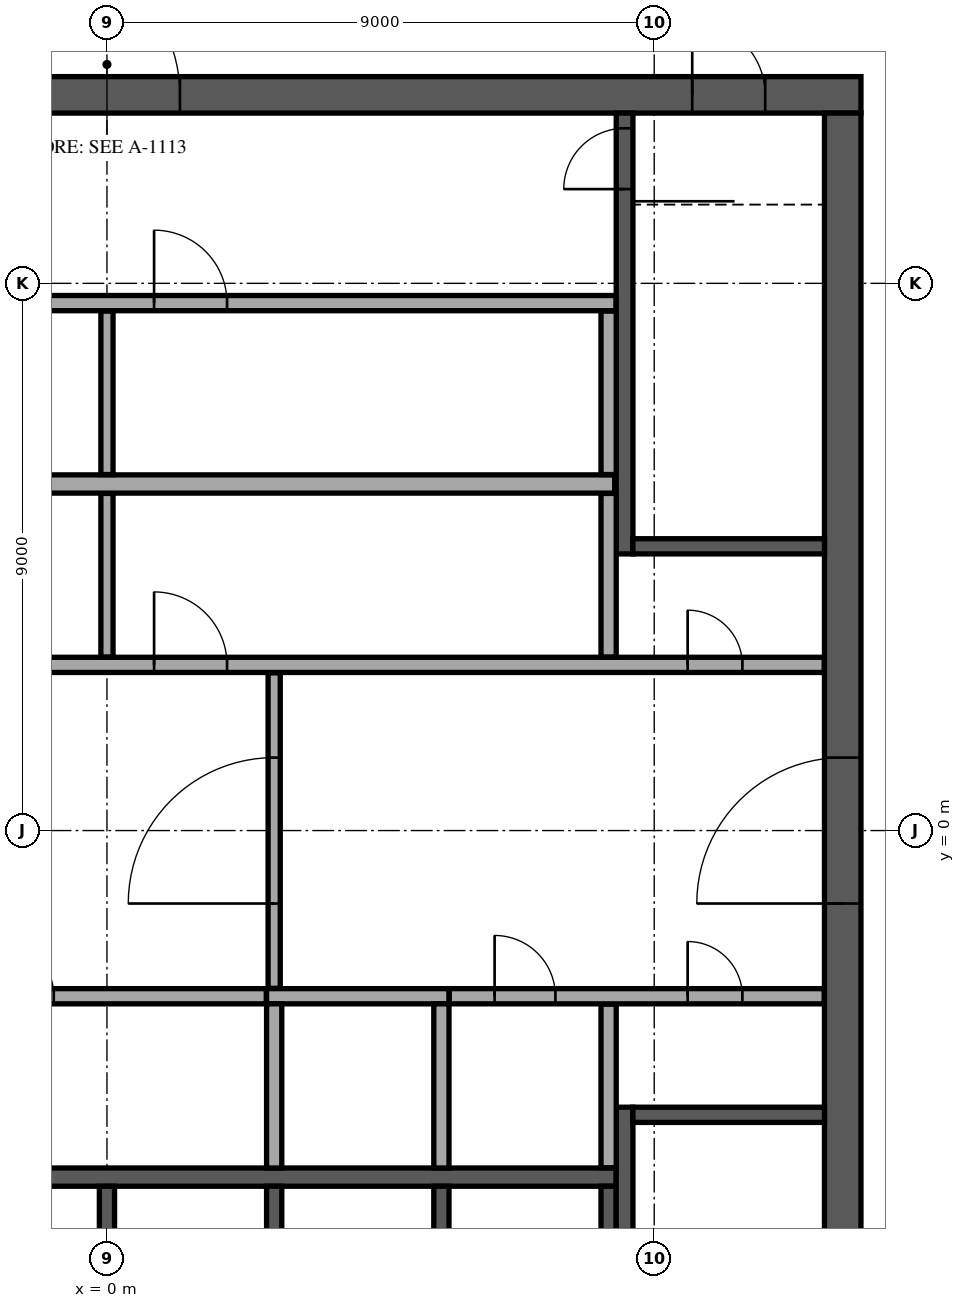
"""IFC4 building model, lengths in metres.
Left out: names, types, materials, properties, quantities, classifications, styles, units other than length and angle.
Written with IfcOpenShell. Run it as: python <this file> out.ifc"""

import sys

from ifc_helpers import new_model, si_unit, direction, frame, frame_2d, origin, place, context, subcontext, project, spatial, rectangle, extrude, element, fill, save


model = new_model("IFC4")
c1 = context("Model", 3, precision=1e-05, world=origin(), true_north=direction((0.0, 1.0)))
c2 = subcontext(c1, "Body", "Model", "MODEL_VIEW")
j1 = project(units=[si_unit("LENGTHUNIT", "METRE"), si_unit("PLANEANGLEUNIT", "RADIAN")], contexts=[c1])
p1 = place(None, origin())
s1 = spatial("IfcSite", under=j1, at=p1, CompositionType="ELEMENT")
p2 = place(p1, origin())
s2 = spatial("IfcBuilding", under=s1, at=p2, CompositionType="ELEMENT")
p3 = place(p2, frame((0.0, 0.0, 373.1)))
s3 = spatial("IfcBuildingStorey", under=s2, at=p3, CompositionType="ELEMENT", Elevation=373.1)
p4 = place(p3, frame((-12.4, 12.1, 0.0), z_axis=(0.0, 0.0, 1.0), x_axis=(1.0, 0.0, 0.0)))
e1 = element("IfcWall", 1, at=p4, inside=s3, PredefinedType="SHEAR", context=c2, shape_type="SweptSolid", body=[
    extrude(rectangle(XDim=24.8, YDim=0.6, at=frame_2d((12.4, 0.0))), origin(), (0.0, 0.0, 1.0), 3.2),
])
p5 = place(p4, frame((11.2, 0.0, 0.0)))
e2 = element("IfcOpeningElement", 2, at=p5, cuts=e1, PredefinedType="OPENING", context=c2, shape_type="SweptSolid", body=[
    extrude(rectangle(XDim=2.4, YDim=2.4, at=frame_2d((1.2, 1.2))), frame((0.0, 0.31, 0.0), z_axis=(0.0, -1.0, 0.0), x_axis=(1.0, 0.0, 0.0)), (0.0, 0.0, 1.0), 0.62),
])
p6 = place(p4, frame((22.025, 0.0, 0.0)))
e3 = element("IfcOpeningElement", 3, at=p6, cuts=e1, PredefinedType="OPENING", context=c2, shape_type="SweptSolid", body=[
    extrude(rectangle(XDim=1.2, YDim=2.1, at=frame_2d((0.6, 1.05))), frame((0.0, 0.31, 0.0), z_axis=(0.0, -1.0, 0.0), x_axis=(1.0, 0.0, 0.0)), (0.0, 0.0, 1.0), 0.62),
])
p7 = place(p4, frame((1.0, 0.0, 0.0)))
e4 = element("IfcOpeningElement", 4, at=p7, cuts=e1, PredefinedType="OPENING", context=c2, shape_type="SweptSolid", body=[
    extrude(rectangle(XDim=1.0, YDim=2.1, at=frame_2d((0.5, 1.05))), frame((0.0, 0.31, 0.0), z_axis=(0.0, -1.0, 0.0), x_axis=(1.0, 0.0, 0.0)), (0.0, 0.0, 1.0), 0.62),
])
p8 = place(p3, frame((12.1, -11.8, 0.0), z_axis=(0.0, 0.0, 1.0), x_axis=(0.0, 1.0, 0.0)))
e5 = element("IfcWall", 5, at=p8, inside=s3, PredefinedType="SHEAR", context=c2, shape_type="SweptSolid", body=[
    extrude(rectangle(XDim=23.6, YDim=0.6, at=frame_2d((11.8, 0.0))), origin(), (0.0, 0.0, 1.0), 3.2),
])
p9 = place(p8, frame((10.6, 0.0, 0.0)))
e6 = element("IfcOpeningElement", 6, at=p9, cuts=e5, PredefinedType="OPENING", context=c2, shape_type="SweptSolid", body=[
    extrude(rectangle(XDim=2.4, YDim=2.4, at=frame_2d((1.2, 1.2))), frame((0.0, 0.31, 0.0), z_axis=(0.0, -1.0, 0.0), x_axis=(1.0, 0.0, 0.0)), (0.0, 0.0, 1.0), 0.62),
])
p10 = place(p3, frame((-2.875, -5.7, 0.0), z_axis=(0.0, 0.0, 1.0), x_axis=(1.0, 0.0, 0.0)))
e7 = element("IfcWall", 7, at=p10, inside=s3, PredefinedType="SOLIDWALL", context=c2, shape_type="SweptSolid", body=[
    extrude(rectangle(XDim=11.25, YDim=0.3, at=frame_2d((5.625, 0.0))), origin(), (0.0, 0.0, 1.0), 3.2),
])
p11 = place(p3, frame((2.625, -2.725, 0.0), z_axis=(0.0, 0.0, 1.0), x_axis=(1.0, 0.0, 0.0)))
e8 = element("IfcWall", 8, at=p11, inside=s3, PredefinedType="SOLIDWALL", context=c2, shape_type="SweptSolid", body=[
    extrude(rectangle(XDim=3.0, YDim=0.25, at=frame_2d((1.5, 0.0))), origin(), (0.0, 0.0, 1.0), 3.2),
])
for number, where, z_axis, x_axis in (
    (9, (2.75, -5.55, 0.0), (0.0, 0.0, 1.0), (0.0, 1.0, 0.0)),
    (10, (5.5, -5.55, 0.0), (0.0, 0.0, 1.0), (0.0, 1.0, 0.0)),
    (11, (0.0, -8.55, 0.0), (0.0, 0.0, 1.0), (0.0, 1.0, 0.0)),
    (12, (2.75, -8.55, 0.0), (0.0, 0.0, 1.0), (0.0, 1.0, 0.0)),
    (13, (5.5, -8.55, 0.0), (0.0, 0.0, 1.0), (0.0, 1.0, 0.0)),
    (14, (8.25, -8.55, 0.0), (0.0, 0.0, 1.0), (0.0, 1.0, 0.0)),
):
    element("IfcWall", number, at=place(p3, frame(where, z_axis=z_axis, x_axis=x_axis)), inside=s3, PredefinedType="SOLIDWALL", context=c2, shape_type="SweptSolid", body=[
        extrude(rectangle(XDim=2.7, YDim=0.25, at=frame_2d((1.35, 0.0))), origin(), (0.0, 0.0, 1.0), 3.2),
    ])
p12 = place(p3, frame((8.512, 4.55, 0.0), z_axis=(0.0, 0.0, 1.0), x_axis=(0.0, 1.0, 0.0)))
e15 = element("IfcWall", 15, at=p12, inside=s3, PredefinedType="SOLIDWALL", context=c2, shape_type="SweptSolid", body=[
    extrude(rectangle(XDim=7.25, YDim=0.275, at=frame_2d((3.625, 0.0))), origin(), (0.0, 0.0, 1.0), 3.2),
])
p13 = place(p12, frame((6.0, 0.0, 0.0)))
e16 = element("IfcOpeningElement", 16, at=p13, cuts=e15, PredefinedType="OPENING", context=c2, shape_type="SweptSolid", body=[
    extrude(rectangle(XDim=1.0, YDim=2.1, at=frame_2d((0.5, 1.05))), frame((0.0, 0.147, 0.0), z_axis=(0.0, -1.0, 0.0), x_axis=(1.0, 0.0, 0.0)), (0.0, 0.0, 1.0), 0.295),
])
p14 = place(p3, frame((8.65, 4.675, 0.0), z_axis=(0.0, 0.0, 1.0), x_axis=(1.0, 0.0, 0.0)))
e17 = element("IfcWall", 17, at=p14, inside=s3, PredefinedType="SOLIDWALL", context=c2, shape_type="SweptSolid", body=[
    extrude(rectangle(XDim=3.15, YDim=0.25, at=frame_2d((1.575, 0.0))), origin(), (0.0, 0.0, 1.0), 3.2),
])
p15 = place(p3, frame((8.512, -4.55, 0.0), z_axis=(0.0, 0.0, 1.0), x_axis=(0.0, -1.0, 0.0)))
e18 = element("IfcWall", 18, at=p15, inside=s3, PredefinedType="SOLIDWALL", context=c2, shape_type="SweptSolid", body=[
    extrude(rectangle(XDim=7.25, YDim=0.275, at=frame_2d((3.625, 0.0))), origin(), (0.0, 0.0, 1.0), 3.2),
])
p16 = place(p15, frame((6.0, 0.0, 0.0)))
e19 = element("IfcOpeningElement", 19, at=p16, cuts=e18, PredefinedType="OPENING", context=c2, shape_type="SweptSolid", body=[
    extrude(rectangle(XDim=1.0, YDim=2.1, at=frame_2d((0.5, 1.05))), frame((0.0, 0.147, 0.0), z_axis=(0.0, -1.0, 0.0), x_axis=(1.0, 0.0, 0.0)), (0.0, 0.0, 1.0), 0.295),
])
p17 = place(p3, frame((8.65, -4.675, 0.0), z_axis=(0.0, 0.0, 1.0), x_axis=(1.0, 0.0, 0.0)))
e20 = element("IfcWall", 20, at=p17, inside=s3, PredefinedType="SOLIDWALL", context=c2, shape_type="SweptSolid", body=[
    extrude(rectangle(XDim=3.15, YDim=0.25, at=frame_2d((1.575, 0.0))), origin(), (0.0, 0.0, 1.0), 3.2),
])
p18 = place(p3, frame((8.25, -5.545, 0.0), z_axis=(0.0, 0.0, 1.0), x_axis=(0.0, 1.0, 0.0)))
e21 = element("IfcWall", 21, at=p18, inside=s3, PredefinedType="PARTITIONING", context=c2, shape_type="SweptSolid", body=[
    extrude(rectangle(XDim=2.69, YDim=0.25, at=frame_2d((1.345, 0.0))), origin(), (0.0, 0.0, 1.0), 3.2),
])
p19 = place(p3, frame((-11.795, -2.725, 0.0), z_axis=(0.0, 0.0, 1.0), x_axis=(1.0, 0.0, 0.0)))
e22 = element("IfcWall", 22, at=p19, inside=s3, PredefinedType="PARTITIONING", context=c2, shape_type="SweptSolid", body=[
    extrude(rectangle(XDim=14.415, YDim=0.25, at=frame_2d((7.208, 0.0))), origin(), (0.0, 0.0, 1.0), 3.2),
])
p20 = place(p19, frame((1.295, 0.0, 0.0)))
e23 = element("IfcOpeningElement", 23, at=p20, cuts=e22, PredefinedType="OPENING", context=c2, shape_type="SweptSolid", body=[
    extrude(rectangle(XDim=1.0, YDim=2.1, at=frame_2d((0.5, 1.05))), frame((0.0, 0.135, 0.0), z_axis=(0.0, -1.0, 0.0), x_axis=(1.0, 0.0, 0.0)), (0.0, 0.0, 1.0), 0.27),
])
p21 = place(p19, frame((4.42, 0.0, 0.0)))
e24 = element("IfcOpeningElement", 24, at=p21, cuts=e22, PredefinedType="OPENING", context=c2, shape_type="SweptSolid", body=[
    extrude(rectangle(XDim=1.0, YDim=2.1, at=frame_2d((0.5, 1.05))), frame((0.0, 0.135, 0.0), z_axis=(0.0, -1.0, 0.0), x_axis=(1.0, 0.0, 0.0)), (0.0, 0.0, 1.0), 0.27),
])
p22 = place(p19, frame((9.92, 0.0, 0.0)))
e25 = element("IfcOpeningElement", 25, at=p22, cuts=e22, PredefinedType="OPENING", context=c2, shape_type="SweptSolid", body=[
    extrude(rectangle(XDim=1.0, YDim=2.1, at=frame_2d((0.5, 1.05))), frame((0.0, 0.135, 0.0), z_axis=(0.0, -1.0, 0.0), x_axis=(1.0, 0.0, 0.0)), (0.0, 0.0, 1.0), 0.27),
])
p23 = place(p3, frame((5.63, -2.725, 0.0), z_axis=(0.0, 0.0, 1.0), x_axis=(1.0, 0.0, 0.0)))
e26 = element("IfcWall", 26, at=p23, inside=s3, PredefinedType="PARTITIONING", context=c2, shape_type="SweptSolid", body=[
    extrude(rectangle(XDim=6.165, YDim=0.25, at=frame_2d((3.083, 0.0))), origin(), (0.0, 0.0, 1.0), 3.2),
])
p24 = place(p23, frame((0.745, 0.0, 0.0)))
e27 = element("IfcOpeningElement", 27, at=p24, cuts=e26, PredefinedType="OPENING", context=c2, shape_type="SweptSolid", body=[
    extrude(rectangle(XDim=1.0, YDim=2.1, at=frame_2d((0.5, 1.05))), frame((0.0, 0.135, 0.0), z_axis=(0.0, -1.0, 0.0), x_axis=(1.0, 0.0, 0.0)), (0.0, 0.0, 1.0), 0.27),
])
p25 = place(p23, frame((3.92, 0.0, 0.0)))
e28 = element("IfcOpeningElement", 28, at=p25, cuts=e26, PredefinedType="OPENING", context=c2, shape_type="SweptSolid", body=[
    extrude(rectangle(XDim=0.9, YDim=2.1, at=frame_2d((0.45, 1.05))), frame((0.0, 0.135, 0.0), z_axis=(0.0, -1.0, 0.0), x_axis=(1.0, 0.0, 0.0)), (0.0, 0.0, 1.0), 0.27),
])
p26 = place(p3, frame((2.75, -2.595, 0.0), z_axis=(0.0, 0.0, 1.0), x_axis=(0.0, 1.0, 0.0)))
e29 = element("IfcWall", 29, at=p26, inside=s3, PredefinedType="PARTITIONING", context=c2, shape_type="SweptSolid", body=[
    extrude(rectangle(XDim=5.19, YDim=0.2, at=frame_2d((2.595, 0.0))), origin(), (0.0, 0.0, 1.0), 3.2),
])
p27 = place(p26, frame((1.395, 0.0, 0.0)))
e30 = element("IfcOpeningElement", 30, at=p27, cuts=e29, PredefinedType="OPENING", context=c2, shape_type="SweptSolid", body=[
    extrude(rectangle(XDim=2.4, YDim=2.4, at=frame_2d((1.2, 1.2))), frame((0.0, 0.11, 0.0), z_axis=(0.0, -1.0, 0.0), x_axis=(1.0, 0.0, 0.0)), (0.0, 0.0, 1.0), 0.22),
])
p28 = place(p3, frame((-11.795, 2.725, 0.0), z_axis=(0.0, 0.0, 1.0), x_axis=(1.0, 0.0, 0.0)))
e31 = element("IfcWall", 31, at=p28, inside=s3, PredefinedType="PARTITIONING", context=c2, shape_type="SweptSolid", body=[
    extrude(rectangle(XDim=23.59, YDim=0.25, at=frame_2d((11.795, 0.0))), origin(), (0.0, 0.0, 1.0), 3.2),
])
p29 = place(p28, frame((21.345, 0.0, 0.0)))
e32 = element("IfcOpeningElement", 32, at=p29, cuts=e31, PredefinedType="OPENING", context=c2, shape_type="SweptSolid", body=[
    extrude(rectangle(XDim=0.9, YDim=2.1, at=frame_2d((0.45, 1.05))), frame((0.0, 0.135, 0.0), z_axis=(0.0, -1.0, 0.0), x_axis=(1.0, 0.0, 0.0)), (0.0, 0.0, 1.0), 0.27),
])
p30 = place(p28, frame((1.345, 0.0, 0.0)))
e33 = element("IfcOpeningElement", 33, at=p30, cuts=e31, PredefinedType="OPENING", context=c2, shape_type="SweptSolid", body=[
    extrude(rectangle(XDim=0.9, YDim=2.1, at=frame_2d((0.45, 1.05))), frame((0.0, 0.135, 0.0), z_axis=(0.0, -1.0, 0.0), x_axis=(1.0, 0.0, 0.0)), (0.0, 0.0, 1.0), 0.27),
])
p31 = place(p28, frame((4.42, 0.0, 0.0)))
e34 = element("IfcOpeningElement", 34, at=p31, cuts=e31, PredefinedType="OPENING", context=c2, shape_type="SweptSolid", body=[
    extrude(rectangle(XDim=1.0, YDim=2.1, at=frame_2d((0.5, 1.05))), frame((0.0, 0.135, 0.0), z_axis=(0.0, -1.0, 0.0), x_axis=(1.0, 0.0, 0.0)), (0.0, 0.0, 1.0), 0.27),
])
p32 = place(p28, frame((7.17, 0.0, 0.0)))
e35 = element("IfcOpeningElement", 35, at=p32, cuts=e31, PredefinedType="OPENING", context=c2, shape_type="SweptSolid", body=[
    extrude(rectangle(XDim=1.0, YDim=2.1, at=frame_2d((0.5, 1.05))), frame((0.0, 0.135, 0.0), z_axis=(0.0, -1.0, 0.0), x_axis=(1.0, 0.0, 0.0)), (0.0, 0.0, 1.0), 0.27),
])
p33 = place(p28, frame((12.57, 0.0, 0.0)))
e36 = element("IfcOpeningElement", 36, at=p33, cuts=e31, PredefinedType="OPENING", context=c2, shape_type="SweptSolid", body=[
    extrude(rectangle(XDim=1.2, YDim=2.1, at=frame_2d((0.6, 1.05))), frame((0.0, 0.135, 0.0), z_axis=(0.0, -1.0, 0.0), x_axis=(1.0, 0.0, 0.0)), (0.0, 0.0, 1.0), 0.27),
])
p34 = place(p3, frame((0.0, 2.855, 0.0), z_axis=(0.0, 0.0, 1.0), x_axis=(0.0, 1.0, 0.0)))
e37 = element("IfcWall", 37, at=p34, inside=s3, PredefinedType="PARTITIONING", context=c2, shape_type="SweptSolid", body=[
    extrude(rectangle(XDim=2.69, YDim=0.2, at=frame_2d((1.345, 0.0))), origin(), (0.0, 0.0, 1.0), 3.2),
])
p35 = place(p3, frame((8.25, 2.855, 0.0), z_axis=(0.0, 0.0, 1.0), x_axis=(0.0, 1.0, 0.0)))
e38 = element("IfcWall", 38, at=p35, inside=s3, PredefinedType="PARTITIONING", context=c2, shape_type="SweptSolid", body=[
    extrude(rectangle(XDim=2.69, YDim=0.25, at=frame_2d((1.345, 0.0))), origin(), (0.0, 0.0, 1.0), 3.2),
])
p36 = place(p3, frame((-8.35, 5.7, 0.0), z_axis=(0.0, 0.0, 1.0), x_axis=(1.0, 0.0, 0.0)))
e39 = element("IfcWall", 39, at=p36, inside=s3, PredefinedType="PARTITIONING", context=c2, shape_type="SweptSolid", body=[
    extrude(rectangle(XDim=16.7, YDim=0.3, at=frame_2d((8.35, 0.0))), origin(), (0.0, 0.0, 1.0), 3.2),
])
p37 = place(p3, frame((0.0, 5.855, 0.0), z_axis=(0.0, 0.0, 1.0), x_axis=(0.0, 1.0, 0.0)))
e40 = element("IfcWall", 40, at=p37, inside=s3, PredefinedType="PARTITIONING", context=c2, shape_type="SweptSolid", body=[
    extrude(rectangle(XDim=2.69, YDim=0.2, at=frame_2d((1.345, 0.0))), origin(), (0.0, 0.0, 1.0), 3.2),
])
p38 = place(p3, frame((8.25, 5.855, 0.0), z_axis=(0.0, 0.0, 1.0), x_axis=(0.0, 1.0, 0.0)))
e41 = element("IfcWall", 41, at=p38, inside=s3, PredefinedType="PARTITIONING", context=c2, shape_type="SweptSolid", body=[
    extrude(rectangle(XDim=2.69, YDim=0.25, at=frame_2d((1.345, 0.0))), origin(), (0.0, 0.0, 1.0), 3.2),
])
p39 = place(p3, frame((-8.35, 8.675, 0.0), z_axis=(0.0, 0.0, 1.0), x_axis=(1.0, 0.0, 0.0)))
e42 = element("IfcWall", 42, at=p39, inside=s3, PredefinedType="PARTITIONING", context=c2, shape_type="SweptSolid", body=[
    extrude(rectangle(XDim=16.72, YDim=0.25, at=frame_2d((8.36, 0.0))), origin(), (0.0, 0.0, 1.0), 3.2),
])
p40 = place(p39, frame((0.975, 0.0, 0.0)))
e43 = element("IfcOpeningElement", 43, at=p40, cuts=e42, PredefinedType="OPENING", context=c2, shape_type="SweptSolid", body=[
    extrude(rectangle(XDim=1.0, YDim=2.1, at=frame_2d((0.5, 1.05))), frame((0.0, 0.135, 0.0), z_axis=(0.0, -1.0, 0.0), x_axis=(1.0, 0.0, 0.0)), (0.0, 0.0, 1.0), 0.27),
])
p41 = place(p39, frame((3.725, 0.0, 0.0)))
e44 = element("IfcOpeningElement", 44, at=p41, cuts=e42, PredefinedType="OPENING", context=c2, shape_type="SweptSolid", body=[
    extrude(rectangle(XDim=1.0, YDim=2.1, at=frame_2d((0.5, 1.05))), frame((0.0, 0.135, 0.0), z_axis=(0.0, -1.0, 0.0), x_axis=(1.0, 0.0, 0.0)), (0.0, 0.0, 1.0), 0.27),
])
p42 = place(p39, frame((9.125, 0.0, 0.0)))
e45 = element("IfcOpeningElement", 45, at=p42, cuts=e42, PredefinedType="OPENING", context=c2, shape_type="SweptSolid", body=[
    extrude(rectangle(XDim=1.2, YDim=2.1, at=frame_2d((0.6, 1.05))), frame((0.0, 0.135, 0.0), z_axis=(0.0, -1.0, 0.0), x_axis=(1.0, 0.0, 0.0)), (0.0, 0.0, 1.0), 0.27),
])
p43 = place(p5, origin())
e46 = element("IfcDoor", 46, at=p43, inside=s3, OperationType="SINGLE_SWING_LEFT", PredefinedType="DOOR", context=c2, shape_type="SweptSolid", body=[
    extrude(rectangle(XDim=2.4, YDim=2.4, at=frame_2d((1.2, 1.2))), frame((0.0, 0.025, 0.0), z_axis=(0.0, -1.0, 0.0), x_axis=(1.0, 0.0, 0.0)), (0.0, 0.0, 1.0), 0.05),
])
fill(e2, e46)
p44 = place(p6, origin())
e47 = element("IfcDoor", 47, at=p44, inside=s3, OperationType="SINGLE_SWING_LEFT", PredefinedType="DOOR", context=c2, shape_type="SweptSolid", body=[
    extrude(rectangle(XDim=1.2, YDim=2.1, at=frame_2d((0.6, 1.05))), frame((0.0, 0.025, 0.0), z_axis=(0.0, -1.0, 0.0), x_axis=(1.0, 0.0, 0.0)), (0.0, 0.0, 1.0), 0.05),
])
fill(e3, e47)
p45 = place(p9, origin())
e48 = element("IfcDoor", 48, at=p45, inside=s3, OperationType="SINGLE_SWING_LEFT", PredefinedType="DOOR", context=c2, shape_type="SweptSolid", body=[
    extrude(rectangle(XDim=2.4, YDim=2.4, at=frame_2d((1.2, 1.2))), frame((0.0, 0.025, 0.0), z_axis=(0.0, -1.0, 0.0), x_axis=(1.0, 0.0, 0.0)), (0.0, 0.0, 1.0), 0.05),
])
fill(e6, e48)
p46 = place(p13, origin())
e49 = element("IfcDoor", 49, at=p46, inside=s3, OperationType="SINGLE_SWING_LEFT", PredefinedType="DOOR", context=c2, shape_type="SweptSolid", body=[
    extrude(rectangle(XDim=1.0, YDim=2.1, at=frame_2d((0.5, 1.05))), frame((0.0, 0.025, 0.0), z_axis=(0.0, -1.0, 0.0), x_axis=(1.0, 0.0, 0.0)), (0.0, 0.0, 1.0), 0.05),
])
fill(e16, e49)
p47 = place(p24, origin())
e50 = element("IfcDoor", 50, at=p47, inside=s3, OperationType="SINGLE_SWING_RIGHT", PredefinedType="DOOR", context=c2, shape_type="SweptSolid", body=[
    extrude(rectangle(XDim=1.0, YDim=2.1, at=frame_2d((0.5, 1.05))), frame((0.0, 0.025, 0.0), z_axis=(0.0, -1.0, 0.0), x_axis=(1.0, 0.0, 0.0)), (0.0, 0.0, 1.0), 0.05),
])
fill(e27, e50)
p48 = place(p29, origin())
e51 = element("IfcDoor", 51, at=p48, inside=s3, OperationType="SINGLE_SWING_RIGHT", PredefinedType="DOOR", context=c2, shape_type="SweptSolid", body=[
    extrude(rectangle(XDim=0.9, YDim=2.1, at=frame_2d((0.45, 1.05))), frame((0.0, 0.025, 0.0), z_axis=(0.0, -1.0, 0.0), x_axis=(1.0, 0.0, 0.0)), (0.0, 0.0, 1.0), 0.05),
])
fill(e32, e51)
p49 = place(p25, origin())
e52 = element("IfcDoor", 52, at=p49, inside=s3, OperationType="SINGLE_SWING_RIGHT", PredefinedType="DOOR", context=c2, shape_type="SweptSolid", body=[
    extrude(rectangle(XDim=0.9, YDim=2.1, at=frame_2d((0.45, 1.05))), frame((0.0, 0.025, 0.0), z_axis=(0.0, -1.0, 0.0), x_axis=(1.0, 0.0, 0.0)), (0.0, 0.0, 1.0), 0.05),
])
fill(e28, e52)
p50 = place(p33, origin())
e53 = element("IfcDoor", 53, at=p50, inside=s3, OperationType="SINGLE_SWING_LEFT", PredefinedType="DOOR", context=c2, shape_type="SweptSolid", body=[
    extrude(rectangle(XDim=1.2, YDim=2.1, at=frame_2d((0.6, 1.05))), frame((0.0, 0.025, 0.0), z_axis=(0.0, -1.0, 0.0), x_axis=(1.0, 0.0, 0.0)), (0.0, 0.0, 1.0), 0.05),
])
fill(e36, e53)
p51 = place(p42, origin())
e54 = element("IfcDoor", 54, at=p51, inside=s3, OperationType="SINGLE_SWING_LEFT", PredefinedType="DOOR", context=c2, shape_type="SweptSolid", body=[
    extrude(rectangle(XDim=1.2, YDim=2.1, at=frame_2d((0.6, 1.05))), frame((0.0, 0.025, 0.0), z_axis=(0.0, -1.0, 0.0), x_axis=(1.0, 0.0, 0.0)), (0.0, 0.0, 1.0), 0.05),
])
fill(e45, e54)
p52 = place(p22, origin())
e55 = element("IfcDoor", 55, at=p52, inside=s3, OperationType="SINGLE_SWING_RIGHT", PredefinedType="DOOR", context=c2, shape_type="SweptSolid", body=[
    extrude(rectangle(XDim=1.0, YDim=2.1, at=frame_2d((0.5, 1.05))), frame((0.0, 0.025, 0.0), z_axis=(0.0, -1.0, 0.0), x_axis=(1.0, 0.0, 0.0)), (0.0, 0.0, 1.0), 0.05),
])
fill(e25, e55)
p53 = place(p27, origin())
e56 = element("IfcDoor", 56, at=p53, inside=s3, OperationType="DOUBLE_DOOR_DOUBLE_SWING", PredefinedType="DOOR", context=c2, shape_type="SweptSolid", body=[
    extrude(rectangle(XDim=2.4, YDim=2.4, at=frame_2d((1.2, 1.2))), frame((0.0, 0.025, 0.0), z_axis=(0.0, -1.0, 0.0), x_axis=(1.0, 0.0, 0.0)), (0.0, 0.0, 1.0), 0.05),
])
fill(e30, e56)
save(model, sys.argv[1])
